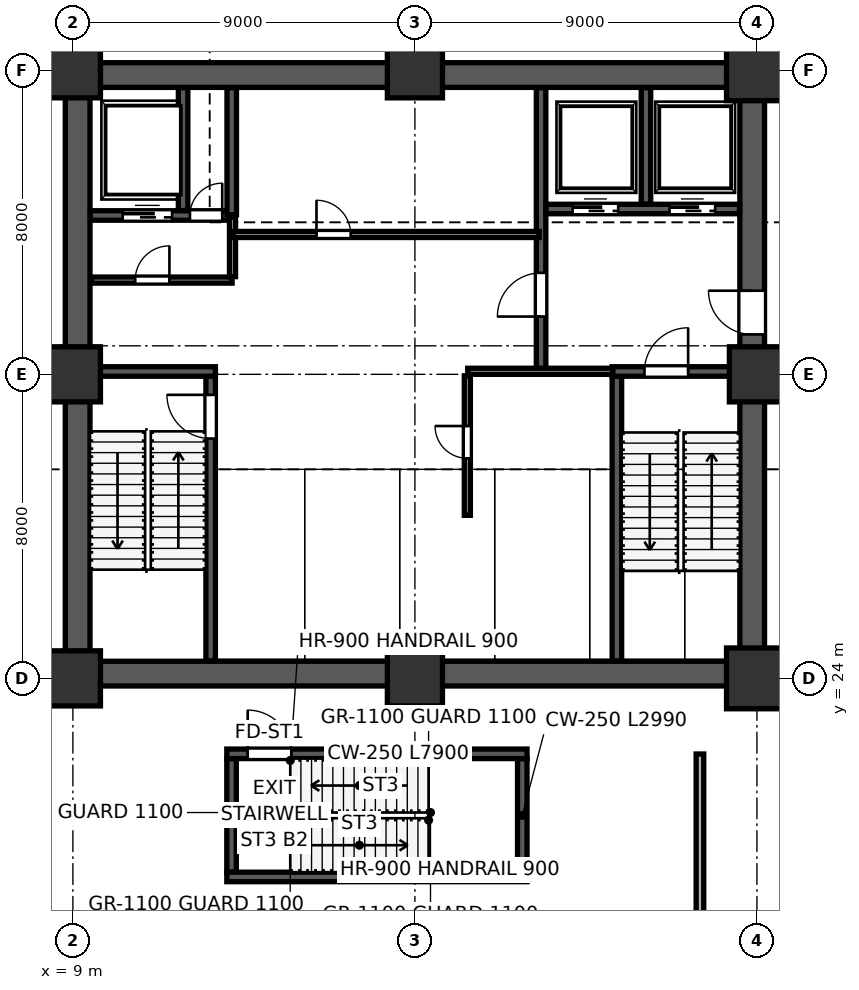
"""IFC4 building model, lengths in metres.
Left out: names, types, materials, properties, quantities, classifications, styles, units other than length and angle.
Written with IfcOpenShell. Run it as: python <this file> out.ifc"""

import sys

from ifc_helpers import new_model, si_unit, direction, frame, frame_2d, origin, origin_2d, place, context, subcontext, project, spatial, rectangle, extrude, source, transform, mapped, element, fill, save


model = new_model("IFC4")
c1 = context("Model", 3, precision=1e-05, world=origin(), true_north=direction((0.0, 1.0)))
c2 = subcontext(c1, "Body", "Model", "MODEL_VIEW")
j1 = project(units=[si_unit("LENGTHUNIT", "METRE"), si_unit("PLANEANGLEUNIT", "RADIAN")], contexts=[c1])
p1 = place(None, origin())
s1 = spatial("IfcSite", under=j1, at=p1, CompositionType="ELEMENT")
p2 = place(p1, origin())
s2 = spatial("IfcBuilding", under=s1, at=p2, CompositionType="ELEMENT")
p3 = place(p2, frame((0.0, 0.0, -9.6)))
s3 = spatial("IfcBuildingStorey", under=s2, at=p3, CompositionType="ELEMENT", Elevation=-9.6)
m1 = source(origin(), c2, "Body", "SweptSolid", [
    extrude(rectangle(XDim=1.45, YDim=1.45, at=origin_2d()), origin(), (0.0, 0.0, 1.0), 4.799),
])
for number, where, z_axis, x_axis in (
    (1, (9.0, 24.0, 0.0), (0.0, 0.0, 1.0), (1.0, 0.0, 0.0)),
    (2, (9.0, 32.0, 0.0), (0.0, 0.0, 1.0), (1.0, 0.0, 0.0)),
    (3, (9.0, 40.0, 0.0), (0.0, 0.0, 1.0), (1.0, 0.0, 0.0)),
    (4, (18.0, 24.0, 0.0), (0.0, 0.0, 1.0), (1.0, 0.0, 0.0)),
    (5, (18.0, 40.0, 0.0), (0.0, 0.0, 1.0), (1.0, 0.0, 0.0)),
):
    element("IfcColumn", number, at=place(p3, frame(where, z_axis=z_axis, x_axis=x_axis)), inside=s3, PredefinedType="COLUMN", context=c2, shape_type="MappedRepresentation", body=[
        mapped(m1, transform((0.0, 0.0, 0.0), scale=1.0)),
    ])
m2 = source(origin(), c2, "Body", "SweptSolid", [
    extrude(rectangle(XDim=1.6, YDim=1.6, at=origin_2d()), origin(), (0.0, 0.0, 1.0), 4.799),
])
p4 = place(p3, frame((27.0, 24.0, 0.0), z_axis=(0.0, 0.0, 1.0), x_axis=(1.0, 0.0, 0.0)))
e6 = element("IfcColumn", 6, at=p4, inside=s3, PredefinedType="COLUMN", context=c2, shape_type="MappedRepresentation", body=[
    mapped(m2, transform((0.0, 0.0, 0.0), scale=1.0)),
])
p5 = place(p3, frame((27.0, 32.0, 0.0), z_axis=(0.0, 0.0, 1.0), x_axis=(1.0, 0.0, 0.0)))
e7 = element("IfcColumn", 7, at=p5, inside=s3, PredefinedType="COLUMN", context=c2, shape_type="MappedRepresentation", body=[
    mapped(m1, transform((0.0, 0.0, 0.0), scale=1.0)),
])
p6 = place(p3, frame((27.0, 40.0, 0.0), z_axis=(0.0, 0.0, 1.0), x_axis=(1.0, 0.0, 0.0)))
e8 = element("IfcColumn", 8, at=p6, inside=s3, PredefinedType="COLUMN", context=c2, shape_type="MappedRepresentation", body=[
    mapped(m2, transform((0.0, 0.0, 0.0), scale=1.0)),
])
p7 = place(p3, frame((9.125, 24.45, 0.0), z_axis=(0.0, 0.0, 1.0), x_axis=(0.0, 1.0, 0.0)))
e9 = element("IfcWall", 9, at=p7, inside=s3, PredefinedType="SHEAR", context=c2, shape_type="SweptSolid", body=[
    extrude(rectangle(XDim=15.1, YDim=0.65, at=frame_2d((7.55, 0.0))), origin(), (0.0, 0.0, 1.0), 4.52),
])
p8 = place(p3, frame((26.875, 24.45, 0.0), z_axis=(0.0, 0.0, 1.0), x_axis=(0.0, 1.0, 0.0)))
e10 = element("IfcWall", 10, at=p8, inside=s3, PredefinedType="SHEAR", context=c2, shape_type="SweptSolid", body=[
    extrude(rectangle(XDim=15.1, YDim=0.65, at=frame_2d((7.55, 0.0))), origin(), (0.0, 0.0, 1.0), 4.52),
])
p9 = place(p8, frame((8.6, 0.0, 0.0)))
e11 = element("IfcOpeningElement", 11, at=p9, cuts=e10, PredefinedType="OPENING", context=c2, shape_type="SweptSolid", body=[
    extrude(rectangle(XDim=1.15, YDim=2.2, at=frame_2d((0.575, 1.1))), frame((0.0, 0.335, 0.0), z_axis=(0.0, -1.0, 0.0), x_axis=(1.0, 0.0, 0.0)), (0.0, 0.0, 1.0), 0.67),
])
for number, where, z_axis, x_axis in (
    (12, (8.8, 24.125, 0.0), (0.0, 0.0, 1.0), (1.0, 0.0, 0.0)),
    (13, (8.8, 39.875, 0.0), (0.0, 0.0, 1.0), (1.0, 0.0, 0.0)),
):
    element("IfcWall", number, at=place(p3, frame(where, z_axis=z_axis, x_axis=x_axis)), inside=s3, PredefinedType="SHEAR", context=c2, shape_type="SweptSolid", body=[
        extrude(rectangle(XDim=18.4, YDim=0.65, at=frame_2d((9.2, 0.0))), origin(), (0.0, 0.0, 1.0), 4.52),
    ])
p10 = place(p3, frame((12.625, 24.46, 0.0), z_axis=(0.0, 0.0, 1.0), x_axis=(0.0, 1.0, 0.0)))
e14 = element("IfcWall", 14, at=p10, inside=s3, PredefinedType="SHEAR", context=c2, shape_type="SweptSolid", body=[
    extrude(rectangle(XDim=7.49, YDim=0.25, at=frame_2d((3.745, 0.0))), origin(), (0.0, 0.0, 1.0), 4.52),
])
p11 = place(p10, frame((5.85, 0.0, 0.0)))
e15 = element("IfcOpeningElement", 15, at=p11, cuts=e14, PredefinedType="OPENING", context=c2, shape_type="SweptSolid", body=[
    extrude(rectangle(XDim=1.15, YDim=2.2, at=frame_2d((0.575, 1.1))), frame((0.0, 0.135, 0.0), z_axis=(0.0, -1.0, 0.0), x_axis=(1.0, 0.0, 0.0)), (0.0, 0.0, 1.0), 0.27),
])
p12 = place(p3, frame((9.46, 32.075, 0.0), z_axis=(0.0, 0.0, 1.0), x_axis=(1.0, 0.0, 0.0)))
e16 = element("IfcWall", 16, at=p12, inside=s3, PredefinedType="SHEAR", context=c2, shape_type="SweptSolid", body=[
    extrude(rectangle(XDim=3.29, YDim=0.25, at=frame_2d((1.645, 0.0))), origin(), (0.0, 0.0, 1.0), 4.52),
])
p13 = place(p3, frame((23.315, 24.46, 0.0), z_axis=(0.0, 0.0, 1.0), x_axis=(0.0, 1.0, 0.0)))
e17 = element("IfcWall", 17, at=p13, inside=s3, PredefinedType="SHEAR", context=c2, shape_type="SweptSolid", body=[
    extrude(rectangle(XDim=7.49, YDim=0.25, at=frame_2d((3.745, 0.0))), origin(), (0.0, 0.0, 1.0), 4.52),
])
p14 = place(p3, frame((23.19, 32.075, 0.0), z_axis=(0.0, 0.0, 1.0), x_axis=(1.0, 0.0, 0.0)))
e18 = element("IfcWall", 18, at=p14, inside=s3, PredefinedType="SHEAR", context=c2, shape_type="SweptSolid", body=[
    extrude(rectangle(XDim=3.35, YDim=0.25, at=frame_2d((1.675, 0.0))), origin(), (0.0, 0.0, 1.0), 4.52),
])
p15 = place(p14, frame((0.85, 0.0, 0.0)))
e19 = element("IfcOpeningElement", 19, at=p15, cuts=e18, PredefinedType="OPENING", context=c2, shape_type="SweptSolid", body=[
    extrude(rectangle(XDim=1.15, YDim=2.2, at=frame_2d((0.575, 1.1))), frame((0.0, 0.135, 0.0), z_axis=(0.0, -1.0, 0.0), x_axis=(1.0, 0.0, 0.0)), (0.0, 0.0, 1.0), 0.27),
])
p16 = place(p3, frame((21.32, 32.12, 0.0), z_axis=(0.0, 0.0, 1.0), x_axis=(0.0, 1.0, 0.0)))
e20 = element("IfcWall", 20, at=p16, inside=s3, PredefinedType="SHEAR", context=c2, shape_type="SweptSolid", body=[
    extrude(rectangle(XDim=7.42, YDim=0.25, at=frame_2d((3.71, 0.0))), origin(), (0.0, 0.0, 1.0), 4.52),
])
p17 = place(p16, frame((1.4, 0.0, 0.0)))
e21 = element("IfcOpeningElement", 21, at=p17, cuts=e20, PredefinedType="OPENING", context=c2, shape_type="SweptSolid", body=[
    extrude(rectangle(XDim=1.15, YDim=2.2, at=frame_2d((0.575, 1.1))), frame((0.0, 0.135, 0.0), z_axis=(0.0, -1.0, 0.0), x_axis=(1.0, 0.0, 0.0)), (0.0, 0.0, 1.0), 0.27),
])
p18 = place(p3, frame((9.46, 36.18, 0.0), z_axis=(0.0, 0.0, 1.0), x_axis=(1.0, 0.0, 0.0)))
e22 = element("IfcWall", 22, at=p18, inside=s3, PredefinedType="SHEAR", context=c2, shape_type="SweptSolid", body=[
    extrude(rectangle(XDim=3.79, YDim=0.25, at=frame_2d((1.895, 0.0))), origin(), (0.0, 0.0, 1.0), 4.52),
])
p19 = place(p18, frame((2.62, 0.0, 0.0)))
e23 = element("IfcOpeningElement", 23, at=p19, cuts=e22, PredefinedType="OPENING", context=c2, shape_type="SweptSolid", body=[
    extrude(rectangle(XDim=0.85, YDim=2.1, at=frame_2d((0.425, 1.05))), frame((0.0, 0.135, 0.0), z_axis=(0.0, -1.0, 0.0), x_axis=(1.0, 0.0, 0.0)), (0.0, 0.0, 1.0), 0.27),
])
p20 = place(p18, frame((0.85, 0.0, 0.0)))
e24 = element("IfcOpeningElement", 24, at=p20, cuts=e22, PredefinedType="OPENING", context=c2, shape_type="SweptSolid", body=[
    extrude(rectangle(XDim=1.3, YDim=2.25, at=frame_2d((0.65, 1.125))), frame((0.0, 0.135, 0.0), z_axis=(0.0, -1.0, 0.0), x_axis=(1.0, 0.0, 0.0)), (0.0, 0.0, 1.0), 0.27),
])
p21 = place(p3, frame((11.9, 36.31, 0.0), z_axis=(0.0, 0.0, 1.0), x_axis=(0.0, 1.0, 0.0)))
e25 = element("IfcWall", 25, at=p21, inside=s3, PredefinedType="SHEAR", context=c2, shape_type="SweptSolid", body=[
    extrude(rectangle(XDim=3.23, YDim=0.25, at=frame_2d((1.615, 0.0))), origin(), (0.0, 0.0, 1.0), 4.52),
])
p22 = place(p3, frame((21.45, 36.35, 0.0), z_axis=(0.0, 0.0, 1.0), x_axis=(1.0, 0.0, 0.0)))
e26 = element("IfcWall", 26, at=p22, inside=s3, PredefinedType="SHEAR", context=c2, shape_type="SweptSolid", body=[
    extrude(rectangle(XDim=5.09, YDim=0.25, at=frame_2d((2.545, 0.0))), origin(), (0.0, 0.0, 1.0), 4.52),
])
p23 = place(p22, frame((0.7, 0.0, 0.0)))
e27 = element("IfcOpeningElement", 27, at=p23, cuts=e26, PredefinedType="OPENING", context=c2, shape_type="SweptSolid", body=[
    extrude(rectangle(XDim=1.2, YDim=2.2, at=frame_2d((0.6, 1.1))), frame((0.0, 0.135, 0.0), z_axis=(0.0, -1.0, 0.0), x_axis=(1.0, 0.0, 0.0)), (0.0, 0.0, 1.0), 0.27),
])
p24 = place(p22, frame((3.25, 0.0, 0.0)))
e28 = element("IfcOpeningElement", 28, at=p24, cuts=e26, PredefinedType="OPENING", context=c2, shape_type="SweptSolid", body=[
    extrude(rectangle(XDim=1.2, YDim=2.2, at=frame_2d((0.6, 1.1))), frame((0.0, 0.135, 0.0), z_axis=(0.0, -1.0, 0.0), x_axis=(1.0, 0.0, 0.0)), (0.0, 0.0, 1.0), 0.27),
])
p25 = place(p3, frame((24.08, 36.48, 0.0), z_axis=(0.0, 0.0, 1.0), x_axis=(0.0, 1.0, 0.0)))
e29 = element("IfcWall", 29, at=p25, inside=s3, PredefinedType="SHEAR", context=c2, shape_type="SweptSolid", body=[
    extrude(rectangle(XDim=3.06, YDim=0.25, at=frame_2d((1.53, 0.0))), origin(), (0.0, 0.0, 1.0), 4.52),
])
p26 = place(p3, frame((13.18, 36.2, 0.0), z_axis=(0.0, 0.0, 1.0), x_axis=(0.0, 1.0, 0.0)))
e30 = element("IfcWall", 30, at=p26, inside=s3, PredefinedType="SHEAR", context=c2, shape_type="SweptSolid", body=[
    extrude(rectangle(XDim=3.34, YDim=0.25, at=frame_2d((1.67, 0.0))), origin(), (0.0, 0.0, 1.0), 4.52),
])
for number, where, z_axis, x_axis in (
    (31, (13.175, 18.9, 0.0), (0.0, 0.0, 1.0), (0.0, 1.0, 0.0)),
    (32, (20.825, 18.9, 0.0), (0.0, 0.0, 1.0), (0.0, 1.0, 0.0)),
):
    element("IfcWall", number, at=place(p3, frame(where, z_axis=z_axis, x_axis=x_axis)), inside=s3, PredefinedType="SHEAR", context=c2, shape_type="SweptSolid", body=[
        extrude(rectangle(XDim=2.99, YDim=0.25, at=frame_2d((1.495, 0.0))), origin(), (0.0, 0.0, 1.0), 4.52),
    ])
p27 = place(p3, frame((13.05, 18.775, 0.0), z_axis=(0.0, 0.0, 1.0), x_axis=(1.0, 0.0, 0.0)))
e33 = element("IfcWall", 33, at=p27, inside=s3, PredefinedType="SHEAR", context=c2, shape_type="SweptSolid", body=[
    extrude(rectangle(XDim=7.9, YDim=0.25, at=frame_2d((3.95, 0.0))), origin(), (0.0, 0.0, 1.0), 4.52),
])
p28 = place(p3, frame((13.05, 22.015, 0.0), z_axis=(0.0, 0.0, 1.0), x_axis=(1.0, 0.0, 0.0)))
e34 = element("IfcWall", 34, at=p28, inside=s3, PredefinedType="SHEAR", context=c2, shape_type="SweptSolid", body=[
    extrude(rectangle(XDim=7.9, YDim=0.25, at=frame_2d((3.95, 0.0))), origin(), (0.0, 0.0, 1.0), 4.52),
])
p29 = place(p28, frame((0.55, 0.0, 0.0)))
e35 = element("IfcOpeningElement", 35, at=p29, cuts=e34, PredefinedType="OPENING", context=c2, shape_type="SweptSolid", body=[
    extrude(rectangle(XDim=1.15, YDim=2.2, at=frame_2d((0.575, 1.1))), frame((0.0, 0.135, 0.0), z_axis=(0.0, -1.0, 0.0), x_axis=(1.0, 0.0, 0.0)), (0.0, 0.0, 1.0), 0.27),
])
p30 = place(p3, frame((9.49, 34.48, 0.0), z_axis=(0.0, 0.0, 1.0), x_axis=(1.0, 0.0, 0.0)))
e36 = element("IfcWall", 36, at=p30, inside=s3, PredefinedType="PARTITIONING", context=c2, shape_type="SweptSolid", body=[
    extrude(rectangle(XDim=3.7, YDim=0.16, at=frame_2d((1.85, 0.0))), origin(), (0.0, 0.0, 1.0), 4.52),
])
p31 = place(p30, frame((1.15, 0.0, 0.0)))
e37 = element("IfcOpeningElement", 37, at=p31, cuts=e36, PredefinedType="OPENING", context=c2, shape_type="SweptSolid", body=[
    extrude(rectangle(XDim=0.9, YDim=2.15, at=frame_2d((0.45, 1.075))), frame((0.0, 0.09, 0.0), z_axis=(0.0, -1.0, 0.0), x_axis=(1.0, 0.0, 0.0)), (0.0, 0.0, 1.0), 0.18),
])
p32 = place(p3, frame((13.2, 34.57, 0.0), z_axis=(0.0, 0.0, 1.0), x_axis=(0.0, 1.0, 0.0)))
e38 = element("IfcWall", 38, at=p32, inside=s3, PredefinedType="PARTITIONING", context=c2, shape_type="SweptSolid", body=[
    extrude(rectangle(XDim=1.57, YDim=0.16, at=frame_2d((0.785, 0.0))), origin(), (0.0, 0.0, 1.0), 4.52),
])
p33 = place(p3, frame((13.21, 35.68, 0.0), z_axis=(0.0, 0.0, 1.0), x_axis=(1.0, 0.0, 0.0)))
e39 = element("IfcWall", 39, at=p33, inside=s3, PredefinedType="PARTITIONING", context=c2, shape_type="SweptSolid", body=[
    extrude(rectangle(XDim=8.06, YDim=0.16, at=frame_2d((4.03, 0.0))), origin(), (0.0, 0.0, 1.0), 4.52),
])
p34 = place(p33, frame((2.2, 0.0, 0.0)))
e40 = element("IfcOpeningElement", 40, at=p34, cuts=e39, PredefinedType="OPENING", context=c2, shape_type="SweptSolid", body=[
    extrude(rectangle(XDim=0.9, YDim=2.15, at=frame_2d((0.45, 1.075))), frame((0.0, 0.09, 0.0), z_axis=(0.0, -1.0, 0.0), x_axis=(1.0, 0.0, 0.0)), (0.0, 0.0, 1.0), 0.18),
])
p35 = place(p3, frame((19.39, 32.08, 0.0), z_axis=(0.0, 0.0, 1.0), x_axis=(1.0, 0.0, 0.0)))
e41 = element("IfcWall", 41, at=p35, inside=s3, PredefinedType="PARTITIONING", context=c2, shape_type="SweptSolid", body=[
    extrude(rectangle(XDim=3.82, YDim=0.16, at=frame_2d((1.91, 0.0))), origin(), (0.0, 0.0, 1.0), 4.52),
])
p36 = place(p3, frame((19.38, 28.29, 0.0), z_axis=(0.0, 0.0, 1.0), x_axis=(0.0, 1.0, 0.0)))
e42 = element("IfcWall", 42, at=p36, inside=s3, PredefinedType="PARTITIONING", context=c2, shape_type="SweptSolid", body=[
    extrude(rectangle(XDim=3.67, YDim=0.16, at=frame_2d((1.835, 0.0))), origin(), (0.0, 0.0, 1.0), 4.52),
])
p37 = place(p36, frame((1.5, 0.0, 0.0)))
e43 = element("IfcOpeningElement", 43, at=p37, cuts=e42, PredefinedType="OPENING", context=c2, shape_type="SweptSolid", body=[
    extrude(rectangle(XDim=0.85, YDim=2.1, at=frame_2d((0.425, 1.05))), frame((0.0, 0.09, 0.0), z_axis=(0.0, -1.0, 0.0), x_axis=(1.0, 0.0, 0.0)), (0.0, 0.0, 1.0), 0.18),
])
p38 = place(p3, frame((27.24, 24.35, 0.0), z_axis=(0.0, 0.0, 1.0), x_axis=(1.0, 0.0, 0.0)))
e44 = element("IfcWall", 44, at=p38, inside=s3, PredefinedType="SOLIDWALL", context=c2, shape_type="SweptSolid", body=[
    extrude(rectangle(XDim=62.22, YDim=0.2, at=frame_2d((31.11, 0.0))), origin(), (0.0, 0.0, 1.0), 3.65),
])
p39 = place(p3, frame((25.5, 16.79, 0.0), z_axis=(0.0, 0.0, 1.0), x_axis=(0.0, 1.0, 0.0)))
e45 = element("IfcWall", 45, at=p39, inside=s3, PredefinedType="SOLIDWALL", context=c2, shape_type="SweptSolid", body=[
    extrude(rectangle(XDim=5.22, YDim=0.2, at=frame_2d((2.61, 0.0))), origin(), (0.0, 0.0, 1.0), 4.52),
])
m3 = source(origin(), c2, "Body", "SweptSolid", [
    extrude(rectangle(XDim=1.15, YDim=2.2, at=frame_2d((0.575, 1.1))), frame((0.0, 0.025, 0.0), z_axis=(0.0, -1.0, 0.0), x_axis=(1.0, 0.0, 0.0)), (0.0, 0.0, 1.0), 0.05),
])
p40 = place(p11, origin())
e46 = element("IfcDoor", 46, at=p40, inside=s3, OperationType="SINGLE_SWING_RIGHT", PredefinedType="DOOR", context=c2, shape_type="MappedRepresentation", body=[
    mapped(m3, transform((0.0, 0.0, 0.0), scale=1.0)),
])
fill(e15, e46)
m4 = source(origin(), c2, "Body", "SweptSolid", [
    extrude(rectangle(XDim=1.15, YDim=2.2, at=frame_2d((0.575, 1.1))), frame((0.0, 0.025, 0.0), z_axis=(0.0, -1.0, 0.0), x_axis=(1.0, 0.0, 0.0)), (0.0, 0.0, 1.0), 0.05),
])
p41 = place(p17, origin())
e47 = element("IfcDoor", 47, at=p41, inside=s3, OperationType="SINGLE_SWING_LEFT", PredefinedType="DOOR", context=c2, shape_type="MappedRepresentation", body=[
    mapped(m4, transform((0.0, 0.0, 0.0), scale=1.0)),
])
fill(e21, e47)
p42 = place(p15, origin())
e48 = element("IfcDoor", 48, at=p42, inside=s3, OperationType="SINGLE_SWING_RIGHT", PredefinedType="DOOR", context=c2, shape_type="MappedRepresentation", body=[
    mapped(m3, transform((0.0, 0.0, 0.0), scale=1.0)),
])
fill(e19, e48)
p43 = place(p9, origin())
e49 = element("IfcDoor", 49, at=p43, inside=s3, OperationType="SINGLE_SWING_RIGHT", PredefinedType="DOOR", context=c2, shape_type="MappedRepresentation", body=[
    mapped(m4, transform((0.0, 0.0, 0.0), scale=1.0)),
])
fill(e11, e49)
p44 = place(p29, origin())
e50 = element("IfcDoor", 50, at=p44, inside=s3, OperationType="SINGLE_SWING_LEFT", PredefinedType="DOOR", context=c2, shape_type="MappedRepresentation", body=[
    mapped(m3, transform((0.0, 0.0, 0.0), scale=1.0)),
])
fill(e35, e50)
m5 = source(origin(), c2, "Body", "SweptSolid", [
    extrude(rectangle(XDim=0.85, YDim=2.1, at=frame_2d((0.425, 1.05))), frame((0.0, 0.025, 0.0), z_axis=(0.0, -1.0, 0.0), x_axis=(1.0, 0.0, 0.0)), (0.0, 0.0, 1.0), 0.05),
])
p45 = place(p19, origin())
e51 = element("IfcDoor", 51, at=p45, inside=s3, OperationType="SINGLE_SWING_RIGHT", PredefinedType="DOOR", context=c2, shape_type="MappedRepresentation", body=[
    mapped(m5, transform((0.0, 0.0, 0.0), scale=1.0)),
])
fill(e23, e51)
m6 = source(origin(), c2, "Body", "SweptSolid", [
    extrude(rectangle(XDim=1.2, YDim=2.2, at=frame_2d((0.6, 1.1))), frame((0.0, 0.025, 0.0), z_axis=(0.0, -1.0, 0.0), x_axis=(1.0, 0.0, 0.0)), (0.0, 0.0, 1.0), 0.05),
])
p46 = place(p23, origin())
e52 = element("IfcDoor", 52, at=p46, inside=s3, OperationType="SLIDING_TO_LEFT", PredefinedType="DOOR", context=c2, shape_type="MappedRepresentation", body=[
    mapped(m6, transform((0.0, 0.0, 0.0), scale=1.0)),
])
fill(e27, e52)
p47 = place(p24, origin())
e53 = element("IfcDoor", 53, at=p47, inside=s3, OperationType="SLIDING_TO_RIGHT", PredefinedType="DOOR", context=c2, shape_type="MappedRepresentation", body=[
    mapped(m6, transform((0.0, 0.0, 0.0), scale=1.0)),
])
fill(e28, e53)
m7 = source(origin(), c2, "Body", "SweptSolid", [
    extrude(rectangle(XDim=1.3, YDim=2.25, at=frame_2d((0.65, 1.125))), frame((0.0, 0.025, 0.0), z_axis=(0.0, -1.0, 0.0), x_axis=(1.0, 0.0, 0.0)), (0.0, 0.0, 1.0), 0.05),
])
p48 = place(p20, origin())
e54 = element("IfcDoor", 54, at=p48, inside=s3, OperationType="SLIDING_TO_LEFT", PredefinedType="DOOR", context=c2, shape_type="MappedRepresentation", body=[
    mapped(m7, transform((0.0, 0.0, 0.0), scale=1.0)),
])
fill(e24, e54)
m8 = source(origin(), c2, "Body", "SweptSolid", [
    extrude(rectangle(XDim=0.9, YDim=2.15, at=frame_2d((0.45, 1.075))), frame((0.0, 0.025, 0.0), z_axis=(0.0, -1.0, 0.0), x_axis=(1.0, 0.0, 0.0)), (0.0, 0.0, 1.0), 0.05),
])
p49 = place(p31, origin())
e55 = element("IfcDoor", 55, at=p49, inside=s3, OperationType="SINGLE_SWING_RIGHT", PredefinedType="DOOR", context=c2, shape_type="MappedRepresentation", body=[
    mapped(m8, transform((0.0, 0.0, 0.0), scale=1.0)),
])
fill(e37, e55)
p50 = place(p34, origin())
e56 = element("IfcDoor", 56, at=p50, inside=s3, OperationType="SINGLE_SWING_LEFT", PredefinedType="DOOR", context=c2, shape_type="MappedRepresentation", body=[
    mapped(m8, transform((0.0, 0.0, 0.0), scale=1.0)),
])
fill(e40, e56)
p51 = place(p37, origin())
e57 = element("IfcDoor", 57, at=p51, inside=s3, OperationType="SINGLE_SWING_RIGHT", PredefinedType="DOOR", context=c2, shape_type="MappedRepresentation", body=[
    mapped(m5, transform((0.0, 0.0, 0.0), scale=1.0)),
])
fill(e43, e57)
save(model, sys.argv[1])
